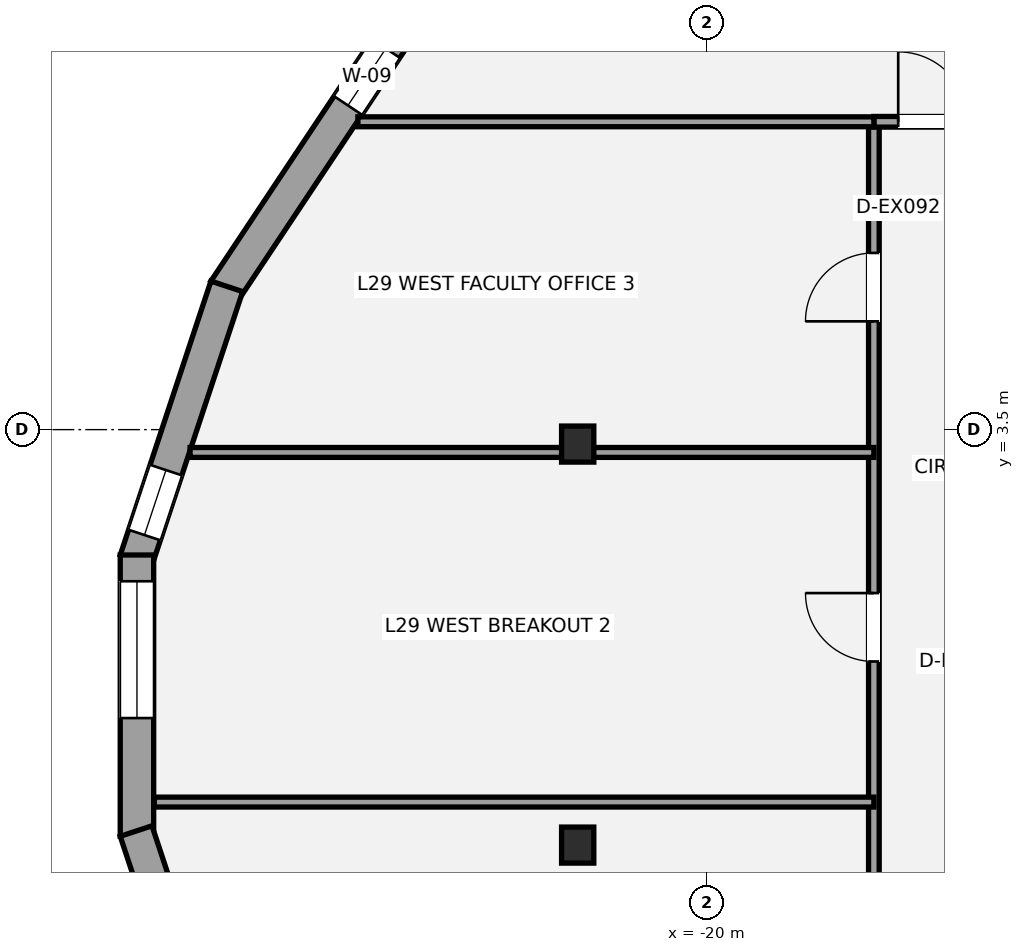
"""IFC4 building model, lengths in metres.
Left out: names, types, materials, properties, quantities, classifications, styles, units other than length and angle.
Written with IfcOpenShell. Run it as: python <this file> out.ifc"""

import sys

from ifc_helpers import new_model, si_unit, direction, frame, frame_2d, origin, origin_2d, place, context, subcontext, project, spatial, rectangle, i_section, extrude, element, fill, save


model = new_model("IFC4")
c1 = context("Model", 3, precision=1e-05, world=origin(), true_north=direction((0.0, 1.0)))
c2 = subcontext(c1, "Body", "Model", "MODEL_VIEW")
j1 = project(units=[si_unit("LENGTHUNIT", "METRE"), si_unit("PLANEANGLEUNIT", "RADIAN")], contexts=[c1])
p1 = place(None, origin())
s1 = spatial("IfcSite", under=j1, at=p1, CompositionType="ELEMENT")
p2 = place(p1, origin())
s2 = spatial("IfcBuilding", under=s1, at=p2, CompositionType="ELEMENT")
p3 = place(p2, frame((0.0, 0.0, 110.6)))
s3 = spatial("IfcBuildingStorey", under=s2, at=p3, CompositionType="ELEMENT", Elevation=110.6)
for number, where, z_axis, x_axis in (
    (1, (-21.697, 3.31, 0.0), (0.0, 0.0, 1.0), (1.0, 0.0, 0.0)),
    (2, (-21.697, -1.966, 0.0), (0.0, 0.0, 1.0), (1.0, 0.0, 0.0)),
):
    element("IfcColumn", number, at=place(p3, frame(where, z_axis=z_axis, x_axis=x_axis)), inside=s3, PredefinedType="COLUMN", context=c2, shape_type="SweptSolid", body=[
        extrude(i_section(OverallWidth=0.424, OverallDepth=0.474, WebThickness=0.048, FlangeThickness=0.077, at=origin_2d()), origin(), (0.0, 0.0, 1.0), 3.5),
    ])
p4 = place(p3, frame((-26.34, 5.332, 0.0), z_axis=(0.0, 0.0, 1.0), x_axis=(0.554293965046, 0.83232097193, 0.0)))
e3 = element("IfcWall", 3, at=p4, inside=s3, PredefinedType="STANDARD", context=c2, shape_type="SweptSolid", body=[
    extrude(rectangle(XDim=4.023, YDim=0.44, at=frame_2d((2.011, 0.0))), origin(), (0.0, 0.0, 1.0), 2.528),
])
p5 = place(p4, frame((2.923, 0.0, 0.58)))
e4 = element("IfcOpeningElement", 4, at=p5, cuts=e3, PredefinedType="OPENING", context=c2, shape_type="SweptSolid", body=[
    extrude(rectangle(XDim=0.9, YDim=1.35, at=frame_2d((0.45, 0.675))), frame((0.0, 0.23, 0.0), z_axis=(0.0, -1.0, 0.0), x_axis=(1.0, 0.0, 0.0)), (0.0, 0.0, 1.0), 0.46),
])
p6 = place(p3, frame((-27.507, 1.781, 0.0), z_axis=(0.0, 0.0, 1.0), x_axis=(0.314316911692, 0.94931811266, 0.0)))
e5 = element("IfcWall", 5, at=p6, inside=s3, PredefinedType="STANDARD", context=c2, shape_type="SweptSolid", body=[
    extrude(rectangle(XDim=3.796, YDim=0.44, at=frame_2d((1.898, 0.0))), origin(), (0.0, 0.0, 1.0), 2.532),
])
p7 = place(p6, frame((0.35, 0.0, 0.58)))
e6 = element("IfcOpeningElement", 6, at=p7, cuts=e5, PredefinedType="OPENING", context=c2, shape_type="SweptSolid", body=[
    extrude(rectangle(XDim=0.9, YDim=1.35, at=frame_2d((0.45, 0.675))), frame((0.0, 0.23, 0.0), z_axis=(0.0, -1.0, 0.0), x_axis=(1.0, 0.0, 0.0)), (0.0, 0.0, 1.0), 0.46),
])
p8 = place(p3, frame((-27.496, -1.851, 0.0), z_axis=(0.0, 0.0, 1.0), x_axis=(0.0, 1.0, 0.0)))
e7 = element("IfcWall", 7, at=p8, inside=s3, PredefinedType="STANDARD", context=c2, shape_type="SweptSolid", body=[
    extrude(rectangle(XDim=3.701, YDim=0.44, at=frame_2d((1.851, 0.0))), origin(), (0.0, 0.0, 1.0), 2.532),
])
p9 = place(p8, frame((1.556, 0.0, 0.65)))
e8 = element("IfcOpeningElement", 8, at=p9, cuts=e7, PredefinedType="OPENING", context=c2, shape_type="SweptSolid", body=[
    extrude(rectangle(XDim=1.8, YDim=1.7, at=frame_2d((0.9, 0.85))), frame((0.0, 0.23, 0.0), z_axis=(0.0, -1.0, 0.0), x_axis=(1.0, 0.0, 0.0)), (0.0, 0.0, 1.0), 0.46),
])
p10 = place(p3, frame((-26.314, -5.385, 0.0), z_axis=(0.0, 0.0, 1.0), x_axis=(-0.314316911692, 0.94931811266, 0.0)))
e9 = element("IfcWall", 9, at=p10, inside=s3, PredefinedType="STANDARD", context=c2, shape_type="SweptSolid", body=[
    extrude(rectangle(XDim=3.796, YDim=0.44, at=frame_2d((1.898, 0.0))), origin(), (0.0, 0.0, 1.0), 2.532),
])
p11 = place(p10, frame((0.399, 0.0, 0.65)))
e10 = element("IfcOpeningElement", 10, at=p11, cuts=e9, PredefinedType="OPENING", context=c2, shape_type="SweptSolid", body=[
    extrude(rectangle(XDim=1.8, YDim=1.7, at=frame_2d((0.9, 0.85))), frame((0.0, 0.23, 0.0), z_axis=(0.0, -1.0, 0.0), x_axis=(1.0, 0.0, 0.0)), (0.0, 0.0, 1.0), 0.46),
])
p12 = place(p3, frame((-17.8, -13.545, 0.0), z_axis=(0.0, 0.0, 1.0), x_axis=(0.0, 1.0, 0.0)))
e11 = element("IfcWall", 11, at=p12, inside=s3, PredefinedType="PARTITIONING", context=c2, shape_type="SweptSolid", body=[
    extrude(rectangle(XDim=21.095, YDim=0.14, at=frame_2d((10.547, 0.0))), origin(), (0.0, 0.0, 1.0), 2.688),
])
p13 = place(p12, frame((9.545, 0.0, 0.0)))
e12 = element("IfcOpeningElement", 12, at=p13, cuts=e11, PredefinedType="OPENING", context=c2, shape_type="SweptSolid", body=[
    extrude(rectangle(XDim=0.9, YDim=2.1, at=frame_2d((0.45, 1.05))), frame((0.0, 0.08, 0.0), z_axis=(0.0, -1.0, 0.0), x_axis=(1.0, 0.0, 0.0)), (0.0, 0.0, 1.0), 0.16),
])
p14 = place(p12, frame((13.995, 0.0, 0.0)))
e13 = element("IfcOpeningElement", 13, at=p14, cuts=e11, PredefinedType="OPENING", context=c2, shape_type="SweptSolid", body=[
    extrude(rectangle(XDim=0.9, YDim=2.1, at=frame_2d((0.45, 1.05))), frame((0.0, 0.08, 0.0), z_axis=(0.0, -1.0, 0.0), x_axis=(1.0, 0.0, 0.0)), (0.0, 0.0, 1.0), 0.16),
])
p15 = place(p12, frame((18.469, 0.0, 0.0)))
e14 = element("IfcOpeningElement", 14, at=p15, cuts=e11, PredefinedType="OPENING", context=c2, shape_type="SweptSolid", body=[
    extrude(rectangle(XDim=0.9, YDim=2.1, at=frame_2d((0.45, 1.05))), frame((0.0, 0.08, 0.0), z_axis=(0.0, -1.0, 0.0), x_axis=(1.0, 0.0, 0.0)), (0.0, 0.0, 1.0), 0.16),
])
p16 = place(p3, frame((-17.8, 7.55, 0.0), z_axis=(0.0, 0.0, 1.0), x_axis=(1.0, 0.0, 0.0)))
e15 = element("IfcWall", 15, at=p16, inside=s3, PredefinedType="PARTITIONING", context=c2, shape_type="SweptSolid", body=[
    extrude(rectangle(XDim=3.9, YDim=0.14, at=frame_2d((1.95, 0.0))), origin(), (0.0, 0.0, 1.0), 2.763),
])
p17 = place(p16, frame((0.32, 0.0, 0.0)))
e16 = element("IfcOpeningElement", 16, at=p17, cuts=e15, PredefinedType="OPENING", context=c2, shape_type="SweptSolid", body=[
    extrude(rectangle(XDim=0.92, YDim=2.15, at=frame_2d((0.46, 1.075))), frame((0.0, 0.08, 0.0), z_axis=(0.0, -1.0, 0.0), x_axis=(1.0, 0.0, 0.0)), (0.0, 0.0, 1.0), 0.16),
])
p18 = place(p3, frame((-24.589, 7.55, 0.0), z_axis=(0.0, 0.0, 1.0), x_axis=(1.0, 0.0, 0.0)))
e17 = element("IfcWall", 17, at=p18, inside=s3, PredefinedType="PARTITIONING", context=c2, shape_type="SweptSolid", body=[
    extrude(rectangle(XDim=6.789, YDim=0.13, at=frame_2d((3.394, 0.0))), origin(), (0.0, 0.0, 1.0), 3.31),
])
p19 = place(p3, frame((-27.268, -1.4, 0.0), z_axis=(0.0, 0.0, 1.0), x_axis=(1.0, 0.0, 0.0)))
e18 = element("IfcWall", 18, at=p19, inside=s3, PredefinedType="PARTITIONING", context=c2, shape_type="SweptSolid", body=[
    extrude(rectangle(XDim=9.468, YDim=0.13, at=frame_2d((4.734, 0.0))), origin(), (0.0, 0.0, 1.0), 2.763),
])
p20 = place(p3, frame((-26.797, 3.2, 0.0), z_axis=(0.0, 0.0, 1.0), x_axis=(1.0, 0.0, 0.0)))
e19 = element("IfcWall", 19, at=p20, inside=s3, PredefinedType="PARTITIONING", context=c2, shape_type="SweptSolid", body=[
    extrude(rectangle(XDim=8.997, YDim=0.13, at=frame_2d((4.499, 0.0))), origin(), (0.0, 0.0, 1.0), 2.763),
])
p21 = place(p5, origin())
e20 = element("IfcWindow", 20, at=p21, inside=s3, PartitioningType="SINGLE_PANEL", PredefinedType="WINDOW", context=c2, shape_type="SweptSolid", body=[
    extrude(rectangle(XDim=0.9, YDim=1.35, at=frame_2d((0.45, 0.675))), frame((0.0, -0.01, 0.0), z_axis=(0.0, -1.0, 0.0), x_axis=(1.0, 0.0, 0.0)), (0.0, 0.0, 1.0), 0.06),
])
fill(e4, e20)
p22 = place(p7, origin())
e21 = element("IfcWindow", 21, at=p22, inside=s3, PartitioningType="SINGLE_PANEL", PredefinedType="WINDOW", context=c2, shape_type="SweptSolid", body=[
    extrude(rectangle(XDim=0.9, YDim=1.35, at=frame_2d((0.45, 0.675))), frame((0.0, -0.01, 0.0), z_axis=(0.0, -1.0, 0.0), x_axis=(1.0, 0.0, 0.0)), (0.0, 0.0, 1.0), 0.06),
])
fill(e6, e21)
p23 = place(p9, origin())
e22 = element("IfcWindow", 22, at=p23, inside=s3, PartitioningType="SINGLE_PANEL", PredefinedType="WINDOW", context=c2, shape_type="SweptSolid", body=[
    extrude(rectangle(XDim=1.8, YDim=1.7, at=frame_2d((0.9, 0.85))), frame((0.0, -0.01, 0.0), z_axis=(0.0, -1.0, 0.0), x_axis=(1.0, 0.0, 0.0)), (0.0, 0.0, 1.0), 0.06),
])
fill(e8, e22)
p24 = place(p17, origin())
e23 = element("IfcDoor", 23, at=p24, inside=s3, OperationType="SINGLE_SWING_LEFT", PredefinedType="DOOR", context=c2, shape_type="SweptSolid", body=[
    extrude(rectangle(XDim=0.92, YDim=2.15, at=frame_2d((0.46, 1.075))), frame((0.0, 0.025, 0.0), z_axis=(0.0, -1.0, 0.0), x_axis=(1.0, 0.0, 0.0)), (0.0, 0.0, 1.0), 0.05),
])
fill(e16, e23)
p25 = place(p14, origin())
e24 = element("IfcDoor", 24, at=p25, inside=s3, OperationType="SINGLE_SWING_RIGHT", PredefinedType="DOOR", context=c2, shape_type="SweptSolid", body=[
    extrude(rectangle(XDim=0.9, YDim=2.1, at=frame_2d((0.45, 1.05))), frame((0.0, 0.025, 0.0), z_axis=(0.0, -1.0, 0.0), x_axis=(1.0, 0.0, 0.0)), (0.0, 0.0, 1.0), 0.05),
])
fill(e13, e24)
p26 = place(p15, origin())
e25 = element("IfcDoor", 25, at=p26, inside=s3, OperationType="SINGLE_SWING_LEFT", PredefinedType="DOOR", context=c2, shape_type="SweptSolid", body=[
    extrude(rectangle(XDim=0.9, YDim=2.1, at=frame_2d((0.45, 1.05))), frame((0.0, 0.025, 0.0), z_axis=(0.0, -1.0, 0.0), x_axis=(1.0, 0.0, 0.0)), (0.0, 0.0, 1.0), 0.05),
])
fill(e14, e25)
save(model, sys.argv[1])
